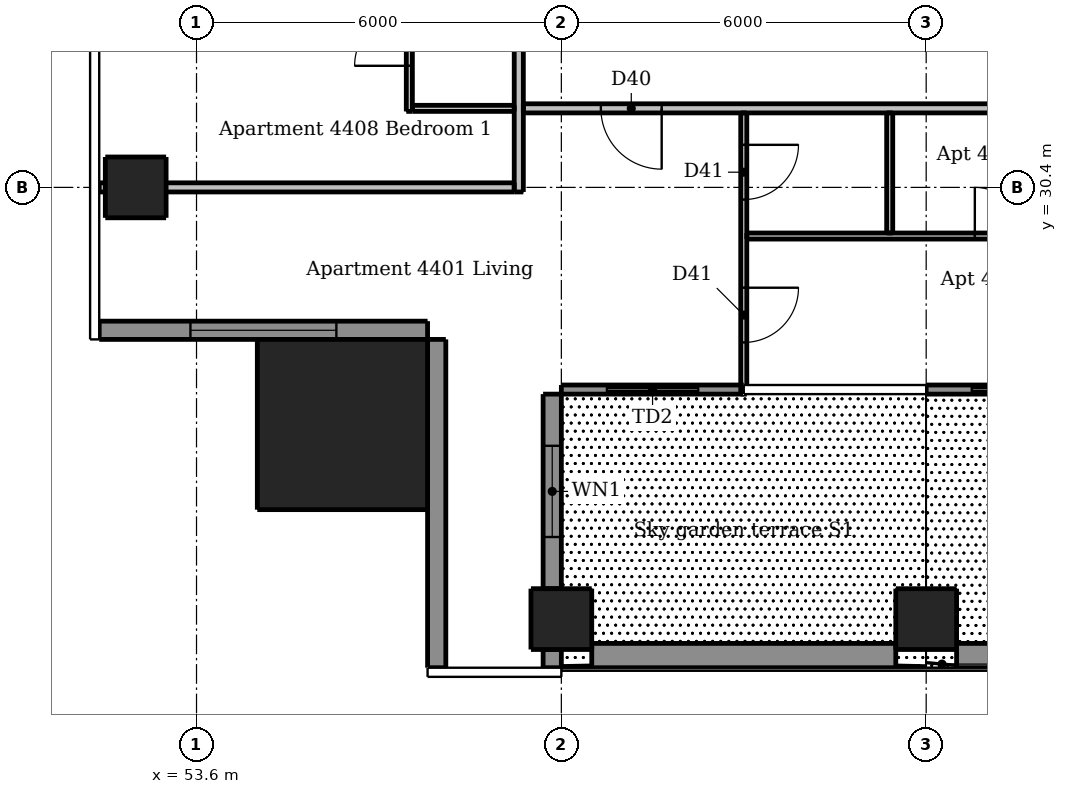
"""IFC4 building model, lengths in metres.
Left out: names, types, materials, properties, quantities, classifications, styles, units other than length and angle.
Written with IfcOpenShell. Run it as: python <this file> out.ifc"""

import sys

from ifc_helpers import new_model, si_unit, direction, frame, frame_2d, origin, origin_2d, place, context, subcontext, project, spatial, rectangle, extrude, element, fill, save


model = new_model("IFC4")
c1 = context("Model", 3, precision=1e-05, world=origin(), true_north=direction((0.0, 1.0)))
c2 = subcontext(c1, "Body", "Model", "MODEL_VIEW")
j1 = project(units=[si_unit("LENGTHUNIT", "METRE"), si_unit("PLANEANGLEUNIT", "RADIAN")], contexts=[c1])
p1 = place(None, origin())
s1 = spatial("IfcSite", under=j1, at=p1, CompositionType="ELEMENT")
p2 = place(p1, origin())
s2 = spatial("IfcBuilding", under=s1, at=p2, CompositionType="ELEMENT")
p3 = place(p2, frame((0.0, 0.0, 164.8)))
s3 = spatial("IfcBuildingStorey", under=s2, at=p3, CompositionType="ELEMENT", Elevation=164.8)
p4 = place(p3, frame((59.6, 23.3, 0.0), z_axis=(0.0, 0.0, 1.0), x_axis=(1.0, 0.0, 0.0)))
e1 = element("IfcColumn", 1, at=p4, inside=s3, PredefinedType="COLUMN", context=c2, shape_type="SweptSolid", body=[
    extrude(rectangle(XDim=1.0, YDim=1.0, at=origin_2d()), origin(), (0.0, 0.0, 1.0), 3.05),
])
p5 = place(p3, frame((65.6, 23.3, 0.0), z_axis=(0.0, 0.0, 1.0), x_axis=(1.0, 0.0, 0.0)))
e2 = element("IfcColumn", 2, at=p5, inside=s3, PredefinedType="COLUMN", context=c2, shape_type="SweptSolid", body=[
    extrude(rectangle(XDim=1.0, YDim=1.0, at=origin_2d()), origin(), (0.0, 0.0, 1.0), 3.3),
])
p6 = place(p3, frame((52.6, 30.4, 0.0), z_axis=(0.0, 0.0, 1.0), x_axis=(1.0, 0.0, 0.0)))
e3 = element("IfcColumn", 3, at=p6, inside=s3, PredefinedType="COLUMN", context=c2, shape_type="SweptSolid", body=[
    extrude(rectangle(XDim=1.0, YDim=1.0, at=origin_2d()), origin(), (0.0, 0.0, 1.0), 3.05),
])
p7 = place(p3, frame((56.0, 26.5, 0.0), z_axis=(0.0, 0.0, 1.0), x_axis=(1.0, 0.0, 0.0)))
e4 = element("IfcColumn", 4, at=p7, inside=s3, PredefinedType="COLUMN", context=c2, shape_type="SweptSolid", body=[
    extrude(rectangle(XDim=2.8, YDim=2.8, at=origin_2d()), origin(), (0.0, 0.0, 1.0), 3.3),
])
p8 = place(p3, frame((59.45, 22.5, 0.0), z_axis=(0.0, 0.0, 1.0), x_axis=(0.0, 1.0, 0.0)))
e5 = element("IfcWall", 5, at=p8, inside=s3, PredefinedType="SOLIDWALL", context=c2, shape_type="SweptSolid", body=[
    extrude(rectangle(XDim=0.3, YDim=0.3, at=frame_2d((0.15, 0.0))), origin(), (0.0, 0.0, 1.0), 3.05),
])
p9 = place(p3, frame((59.45, 23.8, 0.0), z_axis=(0.0, 0.0, 1.0), x_axis=(0.0, 1.0, 0.0)))
e6 = element("IfcWall", 6, at=p9, inside=s3, PredefinedType="SOLIDWALL", context=c2, shape_type="SweptSolid", body=[
    extrude(rectangle(XDim=3.2, YDim=0.3, at=frame_2d((1.6, 0.0))), origin(), (0.0, 0.0, 1.0), 3.05),
])
p10 = place(p9, frame((0.85, 0.0, 0.9)))
e7 = element("IfcOpeningElement", 7, at=p10, cuts=e6, PredefinedType="OPENING", context=c2, shape_type="SweptSolid", body=[
    extrude(rectangle(XDim=1.5, YDim=1.5, at=frame_2d((0.75, 0.75))), frame((0.0, 0.16, 0.0), z_axis=(0.0, -1.0, 0.0), x_axis=(1.0, 0.0, 0.0)), (0.0, 0.0, 1.0), 0.32),
])
p11 = place(p3, frame((52.0, 28.05, 0.0), z_axis=(0.0, 0.0, 1.0), x_axis=(1.0, 0.0, 0.0)))
e8 = element("IfcWall", 8, at=p11, inside=s3, PredefinedType="SOLIDWALL", context=c2, shape_type="SweptSolid", body=[
    extrude(rectangle(XDim=5.4, YDim=0.3, at=frame_2d((2.7, 0.0))), origin(), (0.0, 0.0, 1.0), 3.05),
])
p12 = place(p11, frame((1.5, 0.0, 0.15)))
e9 = element("IfcOpeningElement", 9, at=p12, cuts=e8, PredefinedType="OPENING", context=c2, shape_type="SweptSolid", body=[
    extrude(rectangle(XDim=2.4, YDim=2.1, at=frame_2d((1.2, 1.05))), frame((0.0, 0.16, 0.0), z_axis=(0.0, -1.0, 0.0), x_axis=(1.0, 0.0, 0.0)), (0.0, 0.0, 1.0), 0.32),
])
p13 = place(p3, frame((57.55, 27.9, 0.0), z_axis=(0.0, 0.0, 1.0), x_axis=(0.0, -1.0, 0.0)))
e10 = element("IfcWall", 10, at=p13, inside=s3, PredefinedType="SOLIDWALL", context=c2, shape_type="SweptSolid", body=[
    extrude(rectangle(XDim=5.4, YDim=0.3, at=frame_2d((2.7, 0.0))), origin(), (0.0, 0.0, 1.0), 3.05),
])
p14 = place(p3, frame((59.6, 27.075, 0.0), z_axis=(0.0, 0.0, 1.0), x_axis=(1.0, 0.0, 0.0)))
e11 = element("IfcWall", 11, at=p14, inside=s3, PredefinedType="SOLIDWALL", context=c2, shape_type="SweptSolid", body=[
    extrude(rectangle(XDim=3.0, YDim=0.15, at=frame_2d((1.5, 0.0))), origin(), (0.0, 0.0, 1.0), 3.05),
])
p15 = place(p14, frame((0.75, 0.0, 0.0)))
e12 = element("IfcOpeningElement", 12, at=p15, cuts=e11, PredefinedType="OPENING", context=c2, shape_type="SweptSolid", body=[
    extrude(rectangle(XDim=1.5, YDim=2.4, at=frame_2d((0.75, 1.2))), frame((0.0, 0.085, 0.0), z_axis=(0.0, -1.0, 0.0), x_axis=(1.0, 0.0, 0.0)), (0.0, 0.0, 1.0), 0.17),
])
p16 = place(p3, frame((65.6, 27.075, 0.0), z_axis=(0.0, 0.0, 1.0), x_axis=(1.0, 0.0, 0.0)))
e13 = element("IfcWall", 13, at=p16, inside=s3, PredefinedType="SOLIDWALL", context=c2, shape_type="SweptSolid", body=[
    extrude(rectangle(XDim=3.0, YDim=0.15, at=frame_2d((1.5, 0.0))), origin(), (0.0, 0.0, 1.0), 3.05),
])
p17 = place(p16, frame((0.75, 0.0, 0.0)))
e14 = element("IfcOpeningElement", 14, at=p17, cuts=e13, PredefinedType="OPENING", context=c2, shape_type="SweptSolid", body=[
    extrude(rectangle(XDim=1.5, YDim=2.4, at=frame_2d((0.75, 1.2))), frame((0.0, 0.085, 0.0), z_axis=(0.0, -1.0, 0.0), x_axis=(1.0, 0.0, 0.0)), (0.0, 0.0, 1.0), 0.17),
])
p18 = place(p3, frame((60.1, 22.7, 0.03), z_axis=(0.0, 0.0, 1.0), x_axis=(1.0, 0.0, 0.0)))
e15 = element("IfcWall", 15, at=p18, inside=s3, PredefinedType="PARAPET", context=c2, shape_type="SweptSolid", body=[
    extrude(rectangle(XDim=5.0, YDim=0.4, at=frame_2d((2.5, 0.0))), origin(), (0.0, 0.0, 1.0), 1.1),
])
p19 = place(p3, frame((66.1, 22.7, 0.03), z_axis=(0.0, 0.0, 1.0), x_axis=(1.0, 0.0, 0.0)))
e16 = element("IfcWall", 16, at=p19, inside=s3, PredefinedType="PARAPET", context=c2, shape_type="SweptSolid", body=[
    extrude(rectangle(XDim=5.5, YDim=0.4, at=frame_2d((2.75, 0.0))), origin(), (0.0, 0.0, 1.0), 1.1),
])
p20 = place(p3, frame((57.1, 31.65, 0.0), z_axis=(0.0, 0.0, 1.0), x_axis=(0.0, 1.0, 0.0)))
e17 = element("IfcWall", 17, at=p20, inside=s3, PredefinedType="PARTITIONING", context=c2, shape_type="SweptSolid", body=[
    extrude(rectangle(XDim=16.675, YDim=0.1, at=frame_2d((8.337, 0.0))), origin(), (0.0, 0.0, 1.0), 3.05),
])
p21 = place(p20, frame((9.7, 0.0, 0.0)))
e18 = element("IfcOpeningElement", 18, at=p21, cuts=e17, PredefinedType="OPENING", context=c2, shape_type="SweptSolid", body=[
    extrude(rectangle(XDim=0.9, YDim=2.1, at=frame_2d((0.45, 1.05))), frame((0.0, 0.06, 0.0), z_axis=(0.0, -1.0, 0.0), x_axis=(1.0, 0.0, 0.0)), (0.0, 0.0, 1.0), 0.12),
])
p22 = place(p20, frame((14.8, 0.0, 0.0)))
e19 = element("IfcOpeningElement", 19, at=p22, cuts=e17, PredefinedType="OPENING", context=c2, shape_type="SweptSolid", body=[
    extrude(rectangle(XDim=0.9, YDim=2.1, at=frame_2d((0.45, 1.05))), frame((0.0, 0.06, 0.0), z_axis=(0.0, -1.0, 0.0), x_axis=(1.0, 0.0, 0.0)), (0.0, 0.0, 1.0), 0.12),
])
p23 = place(p20, frame((12.4, 0.0, 0.0)))
e20 = element("IfcOpeningElement", 20, at=p23, cuts=e17, PredefinedType="OPENING", context=c2, shape_type="SweptSolid", body=[
    extrude(rectangle(XDim=0.9, YDim=2.1, at=frame_2d((0.45, 1.05))), frame((0.0, 0.06, 0.0), z_axis=(0.0, -1.0, 0.0), x_axis=(1.0, 0.0, 0.0)), (0.0, 0.0, 1.0), 0.12),
])
p24 = place(p20, frame((5.2, 0.0, 0.0)))
e21 = element("IfcOpeningElement", 21, at=p24, cuts=e17, PredefinedType="OPENING", context=c2, shape_type="SweptSolid", body=[
    extrude(rectangle(XDim=0.9, YDim=2.1, at=frame_2d((0.45, 1.05))), frame((0.0, 0.06, 0.0), z_axis=(0.0, -1.0, 0.0), x_axis=(1.0, 0.0, 0.0)), (0.0, 0.0, 1.0), 0.12),
])
p25 = place(p20, frame((7.05, 0.0, 0.0)))
e22 = element("IfcOpeningElement", 22, at=p25, cuts=e17, PredefinedType="OPENING", context=c2, shape_type="SweptSolid", body=[
    extrude(rectangle(XDim=0.8, YDim=2.1, at=frame_2d((0.4, 1.05))), frame((0.0, 0.06, 0.0), z_axis=(0.0, -1.0, 0.0), x_axis=(1.0, 0.0, 0.0)), (0.0, 0.0, 1.0), 0.12),
])
p26 = place(p20, frame((0.75, 0.0, 0.0)))
e23 = element("IfcOpeningElement", 23, at=p26, cuts=e17, PredefinedType="OPENING", context=c2, shape_type="SweptSolid", body=[
    extrude(rectangle(XDim=0.9, YDim=2.1, at=frame_2d((0.45, 1.05))), frame((0.0, 0.06, 0.0), z_axis=(0.0, -1.0, 0.0), x_axis=(1.0, 0.0, 0.0)), (0.0, 0.0, 1.0), 0.12),
])
p27 = place(p20, frame((3.15, 0.0, 0.0)))
e24 = element("IfcOpeningElement", 24, at=p27, cuts=e17, PredefinedType="OPENING", context=c2, shape_type="SweptSolid", body=[
    extrude(rectangle(XDim=0.8, YDim=2.1, at=frame_2d((0.4, 1.05))), frame((0.0, 0.06, 0.0), z_axis=(0.0, -1.0, 0.0), x_axis=(1.0, 0.0, 0.0)), (0.0, 0.0, 1.0), 0.12),
])
p28 = place(p3, frame((62.6, 31.625, 0.0), z_axis=(0.0, 0.0, 1.0), x_axis=(0.0, -1.0, 0.0)))
e25 = element("IfcWall", 25, at=p28, inside=s3, PredefinedType="PARTITIONING", context=c2, shape_type="SweptSolid", body=[
    extrude(rectangle(XDim=4.625, YDim=0.1, at=frame_2d((2.312, 0.0))), origin(), (0.0, 0.0, 1.0), 3.05),
])
p29 = place(p28, frame((0.525, 0.0, 0.0)))
e26 = element("IfcOpeningElement", 26, at=p29, cuts=e25, PredefinedType="OPENING", context=c2, shape_type="SweptSolid", body=[
    extrude(rectangle(XDim=0.9, YDim=2.1, at=frame_2d((0.45, 1.05))), frame((0.0, 0.06, 0.0), z_axis=(0.0, -1.0, 0.0), x_axis=(1.0, 0.0, 0.0)), (0.0, 0.0, 1.0), 0.12),
])
p30 = place(p28, frame((2.875, 0.0, 0.0)))
e27 = element("IfcOpeningElement", 27, at=p30, cuts=e25, PredefinedType="OPENING", context=c2, shape_type="SweptSolid", body=[
    extrude(rectangle(XDim=0.9, YDim=2.1, at=frame_2d((0.45, 1.05))), frame((0.0, 0.06, 0.0), z_axis=(0.0, -1.0, 0.0), x_axis=(1.0, 0.0, 0.0)), (0.0, 0.0, 1.0), 0.12),
])
p31 = place(p3, frame((65.0, 29.65, 0.0), z_axis=(0.0, 0.0, 1.0), x_axis=(0.0, 1.0, 0.0)))
e28 = element("IfcWall", 28, at=p31, inside=s3, PredefinedType="PARTITIONING", context=c2, shape_type="SweptSolid", body=[
    extrude(rectangle(XDim=1.975, YDim=0.1, at=frame_2d((0.988, 0.0))), origin(), (0.0, 0.0, 1.0), 3.05),
])
p32 = place(p3, frame((57.15, 31.7, 0.0), z_axis=(0.0, 0.0, 1.0), x_axis=(1.0, 0.0, 0.0)))
e29 = element("IfcWall", 29, at=p32, inside=s3, PredefinedType="PARTITIONING", context=c2, shape_type="SweptSolid", body=[
    extrude(rectangle(XDim=1.675, YDim=0.1, at=frame_2d((0.837, 0.0))), origin(), (0.0, 0.0, 1.0), 3.05),
])
p33 = place(p3, frame((62.65, 29.6, 0.0), z_axis=(0.0, 0.0, 1.0), x_axis=(1.0, 0.0, 0.0)))
e30 = element("IfcWall", 30, at=p33, inside=s3, PredefinedType="PARTITIONING", context=c2, shape_type="SweptSolid", body=[
    extrude(rectangle(XDim=5.875, YDim=0.1, at=frame_2d((2.938, 0.0))), origin(), (0.0, 0.0, 1.0), 3.05),
])
p34 = place(p33, frame((3.75, 0.0, 0.0)))
e31 = element("IfcOpeningElement", 31, at=p34, cuts=e30, PredefinedType="OPENING", context=c2, shape_type="SweptSolid", body=[
    extrude(rectangle(XDim=0.8, YDim=2.1, at=frame_2d((0.4, 1.05))), frame((0.0, 0.06, 0.0), z_axis=(0.0, -1.0, 0.0), x_axis=(1.0, 0.0, 0.0)), (0.0, 0.0, 1.0), 0.12),
])
p35 = place(p3, frame((58.9, 30.325, 0.0), z_axis=(0.0, 0.0, 1.0), x_axis=(0.0, 1.0, 0.0)))
e32 = element("IfcWall", 32, at=p35, inside=s3, PredefinedType="PARTITIONING", context=c2, shape_type="SweptSolid", body=[
    extrude(rectangle(XDim=30.85, YDim=0.15, at=frame_2d((15.425, 0.0))), origin(), (0.0, 0.0, 1.0), 3.05),
])
p36 = place(p35, frame((9.225, 0.0, 0.0)))
e33 = element("IfcOpeningElement", 33, at=p36, cuts=e32, PredefinedType="OPENING", context=c2, shape_type="SweptSolid", body=[
    extrude(rectangle(XDim=1.0, YDim=2.1, at=frame_2d((0.5, 1.05))), frame((0.0, 0.085, 0.0), z_axis=(0.0, -1.0, 0.0), x_axis=(1.0, 0.0, 0.0)), (0.0, 0.0, 1.0), 0.17),
])
p37 = place(p35, frame((26.925, 0.0, 0.0)))
e34 = element("IfcOpeningElement", 34, at=p37, cuts=e32, PredefinedType="OPENING", context=c2, shape_type="SweptSolid", body=[
    extrude(rectangle(XDim=1.0, YDim=2.1, at=frame_2d((0.5, 1.05))), frame((0.0, 0.085, 0.0), z_axis=(0.0, -1.0, 0.0), x_axis=(1.0, 0.0, 0.0)), (0.0, 0.0, 1.0), 0.17),
])
p38 = place(p3, frame((89.525, 31.7, 0.0), z_axis=(0.0, 0.0, 1.0), x_axis=(-1.0, 0.0, 0.0)))
e35 = element("IfcWall", 35, at=p38, inside=s3, PredefinedType="PARTITIONING", context=c2, shape_type="SweptSolid", body=[
    extrude(rectangle(XDim=30.55, YDim=0.15, at=frame_2d((15.275, 0.0))), origin(), (0.0, 0.0, 1.0), 3.05),
])
p39 = place(p38, frame((28.275, 0.0, 0.0)))
e36 = element("IfcOpeningElement", 36, at=p39, cuts=e35, PredefinedType="OPENING", context=c2, shape_type="SweptSolid", body=[
    extrude(rectangle(XDim=1.0, YDim=2.1, at=frame_2d((0.5, 1.05))), frame((0.0, 0.085, 0.0), z_axis=(0.0, -1.0, 0.0), x_axis=(1.0, 0.0, 0.0)), (0.0, 0.0, 1.0), 0.17),
])
p40 = place(p38, frame((9.925, 0.0, 0.0)))
e37 = element("IfcOpeningElement", 37, at=p40, cuts=e35, PredefinedType="OPENING", context=c2, shape_type="SweptSolid", body=[
    extrude(rectangle(XDim=1.0, YDim=2.1, at=frame_2d((0.5, 1.05))), frame((0.0, 0.085, 0.0), z_axis=(0.0, -1.0, 0.0), x_axis=(1.0, 0.0, 0.0)), (0.0, 0.0, 1.0), 0.17),
])
p41 = place(p3, frame((52.0, 30.4, 0.0), z_axis=(0.0, 0.0, 1.0), x_axis=(1.0, 0.0, 0.0)))
e38 = element("IfcWall", 38, at=p41, inside=s3, PredefinedType="PARTITIONING", context=c2, shape_type="SweptSolid", body=[
    extrude(rectangle(XDim=6.825, YDim=0.15, at=frame_2d((3.413, 0.0))), origin(), (0.0, 0.0, 1.0), 2.647),
])
p42 = place(p10, origin())
e39 = element("IfcWindow", 39, at=p42, inside=s3, PartitioningType="DOUBLE_PANEL_VERTICAL", PredefinedType="WINDOW", context=c2, shape_type="SweptSolid", body=[
    extrude(rectangle(XDim=1.5, YDim=1.5, at=frame_2d((0.75, 0.75))), frame((0.0, 0.03, 0.0), z_axis=(0.0, -1.0, 0.0), x_axis=(1.0, 0.0, 0.0)), (0.0, 0.0, 1.0), 0.06),
])
fill(e7, e39)
p43 = place(p12, origin())
e40 = element("IfcWindow", 40, at=p43, inside=s3, PartitioningType="DOUBLE_PANEL_VERTICAL", PredefinedType="WINDOW", context=c2, shape_type="SweptSolid", body=[
    extrude(rectangle(XDim=2.4, YDim=2.1, at=frame_2d((1.2, 1.05))), frame((0.0, 0.03, 0.0), z_axis=(0.0, -1.0, 0.0), x_axis=(1.0, 0.0, 0.0)), (0.0, 0.0, 1.0), 0.06),
])
fill(e9, e40)
p44 = place(p15, origin())
e41 = element("IfcDoor", 41, at=p44, inside=s3, OperationType="DOUBLE_DOOR_SLIDING", PredefinedType="DOOR", context=c2, shape_type="SweptSolid", body=[
    extrude(rectangle(XDim=1.5, YDim=2.4, at=frame_2d((0.75, 1.2))), frame((0.0, 0.025, 0.0), z_axis=(0.0, -1.0, 0.0), x_axis=(1.0, 0.0, 0.0)), (0.0, 0.0, 1.0), 0.05),
])
fill(e12, e41)
p45 = place(p17, origin())
e42 = element("IfcDoor", 42, at=p45, inside=s3, OperationType="DOUBLE_DOOR_SLIDING", PredefinedType="DOOR", context=c2, shape_type="SweptSolid", body=[
    extrude(rectangle(XDim=1.5, YDim=2.4, at=frame_2d((0.75, 1.2))), frame((0.0, 0.025, 0.0), z_axis=(0.0, -1.0, 0.0), x_axis=(1.0, 0.0, 0.0)), (0.0, 0.0, 1.0), 0.05),
])
fill(e14, e42)
p46 = place(p39, origin())
e43 = element("IfcDoor", 43, at=p46, inside=s3, OperationType="SINGLE_SWING_LEFT", PredefinedType="DOOR", context=c2, shape_type="SweptSolid", body=[
    extrude(rectangle(XDim=1.0, YDim=2.1, at=frame_2d((0.5, 1.05))), frame((0.0, 0.025, 0.0), z_axis=(0.0, -1.0, 0.0), x_axis=(1.0, 0.0, 0.0)), (0.0, 0.0, 1.0), 0.05),
])
fill(e36, e43)
p47 = place(p29, origin())
e44 = element("IfcDoor", 44, at=p47, inside=s3, OperationType="SINGLE_SWING_LEFT", PredefinedType="DOOR", context=c2, shape_type="SweptSolid", body=[
    extrude(rectangle(XDim=0.9, YDim=2.1, at=frame_2d((0.45, 1.05))), frame((0.0, 0.025, 0.0), z_axis=(0.0, -1.0, 0.0), x_axis=(1.0, 0.0, 0.0)), (0.0, 0.0, 1.0), 0.05),
])
fill(e26, e44)
p48 = place(p30, origin())
e45 = element("IfcDoor", 45, at=p48, inside=s3, OperationType="SINGLE_SWING_LEFT", PredefinedType="DOOR", context=c2, shape_type="SweptSolid", body=[
    extrude(rectangle(XDim=0.9, YDim=2.1, at=frame_2d((0.45, 1.05))), frame((0.0, 0.025, 0.0), z_axis=(0.0, -1.0, 0.0), x_axis=(1.0, 0.0, 0.0)), (0.0, 0.0, 1.0), 0.05),
])
fill(e27, e45)
p49 = place(p34, origin())
e46 = element("IfcDoor", 46, at=p49, inside=s3, OperationType="SINGLE_SWING_LEFT", PredefinedType="DOOR", context=c2, shape_type="SweptSolid", body=[
    extrude(rectangle(XDim=0.8, YDim=2.1, at=frame_2d((0.4, 1.05))), frame((0.0, 0.025, 0.0), z_axis=(0.0, -1.0, 0.0), x_axis=(1.0, 0.0, 0.0)), (0.0, 0.0, 1.0), 0.05),
])
fill(e31, e46)
p50 = place(p26, origin())
e47 = element("IfcDoor", 47, at=p50, inside=s3, OperationType="SINGLE_SWING_LEFT", PredefinedType="DOOR", context=c2, shape_type="SweptSolid", body=[
    extrude(rectangle(XDim=0.9, YDim=2.1, at=frame_2d((0.45, 1.05))), frame((0.0, 0.025, 0.0), z_axis=(0.0, -1.0, 0.0), x_axis=(1.0, 0.0, 0.0)), (0.0, 0.0, 1.0), 0.05),
])
fill(e23, e47)
save(model, sys.argv[1])
